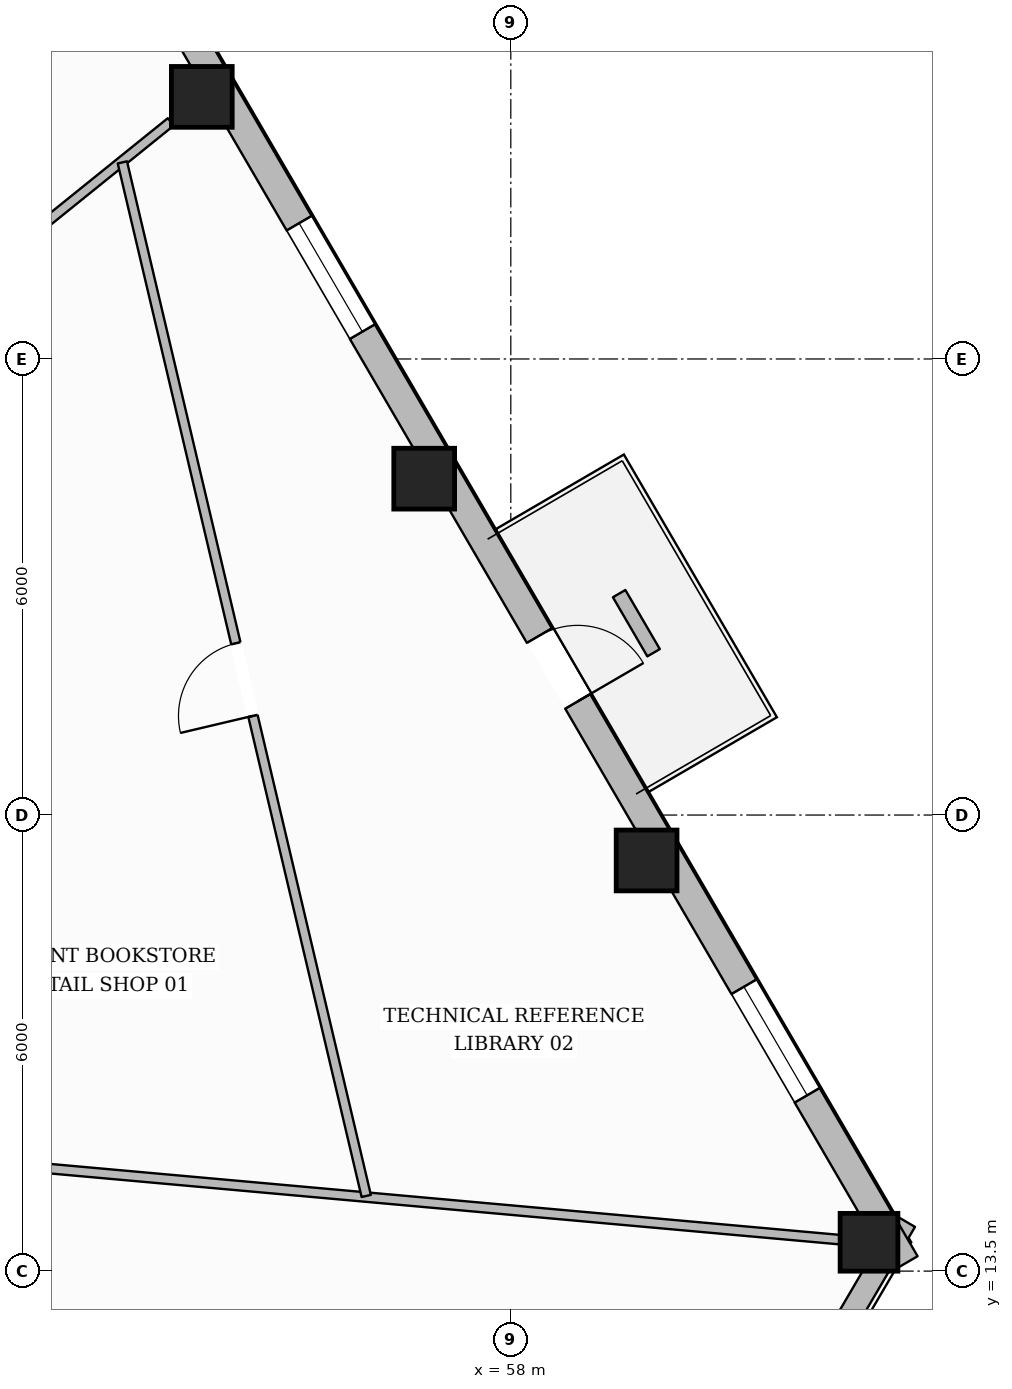
"""IFC4 building model, lengths in metres.
Left out: names, types, materials, properties, quantities, classifications, styles, units other than length and angle.
Written with IfcOpenShell. Run it as: python <this file> out.ifc"""

import sys

from ifc_helpers import new_model, si_unit, direction, frame, frame_2d, origin, origin_2d, place, context, subcontext, project, spatial, rectangle, hollow_rectangle, extrude, element, fill, save


model = new_model("IFC4")
c1 = context("Model", 3, precision=1e-05, world=origin(), true_north=direction((0.0, 1.0)))
c2 = subcontext(c1, "Body", "Model", "MODEL_VIEW")
j1 = project(units=[si_unit("LENGTHUNIT", "METRE"), si_unit("PLANEANGLEUNIT", "RADIAN")], contexts=[c1])
p1 = place(None, origin())
s1 = spatial("IfcSite", under=j1, at=p1, CompositionType="ELEMENT")
p2 = place(p1, origin())
s2 = spatial("IfcBuilding", under=s1, at=p2, CompositionType="ELEMENT")
p3 = place(p2, frame((0.0, 0.0, 63.75)))
s3 = spatial("IfcBuildingStorey", under=s2, at=p3, CompositionType="ELEMENT", Elevation=63.75)
p4 = place(p3, frame((62.712, 13.879, 0.0), z_axis=(0.0, 0.0, 1.0), x_axis=(1.0, 0.0, 0.0)))
e1 = element("IfcColumn", 1, at=p4, inside=s3, PredefinedType="COLUMN", context=c2, shape_type="SweptSolid", body=[
    extrude(hollow_rectangle(XDim=0.76, YDim=0.76, WallThickness=0.035, at=origin_2d()), origin(), (0.0, 0.0, 1.0), 3.59),
])
for number, where, z_axis, x_axis in (
    (2, (59.787, 18.902, 0.0), (0.0, 0.0, 1.0), (1.0, 0.0, 0.0)),
    (3, (56.861, 23.925, 0.0), (0.0, 0.0, 1.0), (1.0, 0.0, 0.0)),
    (4, (53.935, 28.948, 0.0), (0.0, 0.0, 1.0), (1.0, 0.0, 0.0)),
):
    element("IfcColumn", number, at=place(p3, frame(where, z_axis=z_axis, x_axis=x_axis)), inside=s3, PredefinedType="COLUMN", context=c2, shape_type="SweptSolid", body=[
        extrude(hollow_rectangle(XDim=0.8, YDim=0.8, WallThickness=0.036, at=origin_2d()), origin(), (0.0, 0.0, 1.0), 3.59),
    ])
p5 = place(p3, frame((63.188, 14.157, 0.0), z_axis=(0.0, 0.0, 1.0), x_axis=(-0.505432272737, -0.862866280299, 0.0)))
e5 = element("IfcWall", 5, at=p5, inside=s3, PredefinedType="STANDARD", context=c2, shape_type="SweptSolid", body=[
    extrude(rectangle(XDim=15.228, YDim=0.3, at=frame_2d((7.614, 0.0))), origin(), (0.0, 0.0, 1.0), 2.97),
])
p6 = place(p5, frame((7.014, 0.0, 0.65)))
e6 = element("IfcOpeningElement", 6, at=p6, cuts=e5, PredefinedType="OPENING", context=c2, shape_type="SweptSolid", body=[
    extrude(rectangle(XDim=1.2, YDim=1.7, at=frame_2d((0.6, 0.85))), frame((0.0, 0.16, 0.0), z_axis=(0.0, -1.0, 0.0), x_axis=(1.0, 0.0, 0.0)), (0.0, 0.0, 1.0), 0.32),
])
p7 = place(p3, frame((45.15, 44.565, 0.0), z_axis=(0.0, 0.0, 1.0), x_axis=(0.503346513102, -0.864084653114, 0.0)))
e7 = element("IfcWall", 7, at=p7, inside=s3, PredefinedType="STANDARD", context=c2, shape_type="SweptSolid", body=[
    extrude(rectangle(XDim=35.835, YDim=0.38, at=frame_2d((17.917, 0.0))), origin(), (0.0, 0.0, 1.0), 2.97),
])
p8 = place(p7, frame((26.276, 0.0, 0.0)))
e8 = element("IfcOpeningElement", 8, at=p8, cuts=e7, PredefinedType="OPENING", context=c2, shape_type="SweptSolid", body=[
    extrude(rectangle(XDim=1.0, YDim=2.2, at=frame_2d((0.5, 1.1))), frame((0.0, 0.2, 0.0), z_axis=(0.0, -1.0, 0.0), x_axis=(1.0, 0.0, 0.0)), (0.0, 0.0, 1.0), 0.4),
])
p9 = place(p7, frame((31.623, 0.0, 0.65)))
e9 = element("IfcOpeningElement", 9, at=p9, cuts=e7, PredefinedType="OPENING", context=c2, shape_type="SweptSolid", body=[
    extrude(rectangle(XDim=1.65, YDim=1.75, at=frame_2d((0.825, 0.875))), frame((0.0, 0.2, 0.0), z_axis=(0.0, -1.0, 0.0), x_axis=(1.0, 0.0, 0.0)), (0.0, 0.0, 1.0), 0.4),
])
p10 = place(p7, frame((19.997, 0.0, 0.65)))
e10 = element("IfcOpeningElement", 10, at=p10, cuts=e7, PredefinedType="OPENING", context=c2, shape_type="SweptSolid", body=[
    extrude(rectangle(XDim=1.65, YDim=1.75, at=frame_2d((0.825, 0.875))), frame((0.0, 0.2, 0.0), z_axis=(0.0, -1.0, 0.0), x_axis=(1.0, 0.0, 0.0)), (0.0, 0.0, 1.0), 0.4),
])
p11 = place(p7, frame((8.371, 0.0, 0.65)))
e11 = element("IfcOpeningElement", 11, at=p11, cuts=e7, PredefinedType="OPENING", context=c2, shape_type="SweptSolid", body=[
    extrude(rectangle(XDim=1.65, YDim=1.75, at=frame_2d((0.825, 0.875))), frame((0.0, 0.2, 0.0), z_axis=(0.0, -1.0, 0.0), x_axis=(1.0, 0.0, 0.0)), (0.0, 0.0, 1.0), 0.4),
])
p12 = place(p7, frame((2.558, 0.0, 0.65)))
e12 = element("IfcOpeningElement", 12, at=p12, cuts=e7, PredefinedType="OPENING", context=c2, shape_type="SweptSolid", body=[
    extrude(rectangle(XDim=1.65, YDim=1.75, at=frame_2d((0.825, 0.875))), frame((0.0, 0.2, 0.0), z_axis=(0.0, -1.0, 0.0), x_axis=(1.0, 0.0, 0.0)), (0.0, 0.0, 1.0), 0.4),
])
p13 = place(p3, frame((59.878, 21.635, 0.0), z_axis=(0.0, 0.0, 1.0), x_axis=(-0.503483039991, 0.864005109037, 0.0)))
e13 = element("IfcWall", 13, at=p13, inside=s3, PredefinedType="USERDEFINED", context=c2, shape_type="SweptSolid", body=[
    extrude(rectangle(XDim=0.9, YDim=0.19, at=frame_2d((0.45, 0.0))), origin(), (0.0, 0.0, 1.0), 0.5),
])
p14 = place(p3, frame((49.262, 25.18, 0.0), z_axis=(0.0, 0.0, 1.0), x_axis=(0.778476255844, 0.627674054815, 0.0)))
e14 = element("IfcWall", 14, at=p14, inside=s3, PredefinedType="PARTITIONING", context=c2, shape_type="SweptSolid", body=[
    extrude(rectangle(XDim=5.479, YDim=0.125, at=frame_2d((2.739, 0.0))), origin(), (0.0, 0.0, 1.0), 3.057),
])
p15 = place(p3, frame((50.101, 15.013, 0.0), z_axis=(0.0, 0.0, 1.0), x_axis=(0.995987233075, -0.089495427542, 0.0)))
e15 = element("IfcWall", 15, at=p15, inside=s3, PredefinedType="PARTITIONING", context=c2, shape_type="SweptSolid", body=[
    extrude(rectangle(XDim=12.273, YDim=0.125, at=frame_2d((6.137, 0.0))), origin(), (0.0, 0.0, 1.0), 3.057),
])
p16 = place(p3, frame((56.098, 14.489, 0.0), z_axis=(0.0, 0.0, 1.0), x_axis=(-0.229640261557, 0.973275577764, 0.0)))
e16 = element("IfcWall", 16, at=p16, inside=s3, PredefinedType="PARTITIONING", context=c2, shape_type="SweptSolid", body=[
    extrude(rectangle(XDim=13.971, YDim=0.125, at=frame_2d((6.985, 0.0))), origin(), (0.0, 0.0, 1.0), 3.278),
])
p17 = place(p16, frame((6.49, 0.0, 0.0)))
e17 = element("IfcOpeningElement", 17, at=p17, cuts=e16, PredefinedType="OPENING", context=c2, shape_type="SweptSolid", body=[
    extrude(rectangle(XDim=0.98, YDim=2.15, at=frame_2d((0.49, 1.075))), frame((0.0, 0.073, 0.0), z_axis=(0.0, -1.0, 0.0), x_axis=(1.0, 0.0, 0.0)), (0.0, 0.0, 1.0), 0.145),
])
p18 = place(p8, origin())
e18 = element("IfcDoor", 18, at=p18, inside=s3, OperationType="SINGLE_SWING_RIGHT", PredefinedType="DOOR", context=c2, shape_type="SweptSolid", body=[
    extrude(rectangle(XDim=1.0, YDim=2.2, at=frame_2d((0.5, 1.1))), frame((0.0, 0.025, 0.0), z_axis=(0.0, -1.0, 0.0), x_axis=(1.0, 0.0, 0.0)), (0.0, 0.0, 1.0), 0.05),
])
fill(e8, e18)
p19 = place(p9, origin())
e19 = element("IfcWindow", 19, at=p19, inside=s3, PartitioningType="SINGLE_PANEL", PredefinedType="WINDOW", context=c2, shape_type="SweptSolid", body=[
    extrude(rectangle(XDim=1.65, YDim=1.75, at=frame_2d((0.825, 0.875))), frame((0.0, 0.03, 0.0), z_axis=(0.0, -1.0, 0.0), x_axis=(1.0, 0.0, 0.0)), (0.0, 0.0, 1.0), 0.06),
])
fill(e9, e19)
p20 = place(p10, origin())
e20 = element("IfcWindow", 20, at=p20, inside=s3, PartitioningType="SINGLE_PANEL", PredefinedType="WINDOW", context=c2, shape_type="SweptSolid", body=[
    extrude(rectangle(XDim=1.65, YDim=1.75, at=frame_2d((0.825, 0.875))), frame((0.0, 0.03, 0.0), z_axis=(0.0, -1.0, 0.0), x_axis=(1.0, 0.0, 0.0)), (0.0, 0.0, 1.0), 0.06),
])
fill(e10, e20)
p21 = place(p17, origin())
e21 = element("IfcDoor", 21, at=p21, inside=s3, OperationType="SINGLE_SWING_LEFT", PredefinedType="DOOR", context=c2, shape_type="SweptSolid", body=[
    extrude(rectangle(XDim=0.98, YDim=2.15, at=frame_2d((0.49, 1.075))), frame((0.0, 0.025, 0.0), z_axis=(0.0, -1.0, 0.0), x_axis=(1.0, 0.0, 0.0)), (0.0, 0.0, 1.0), 0.05),
])
fill(e17, e21)
save(model, sys.argv[1])
